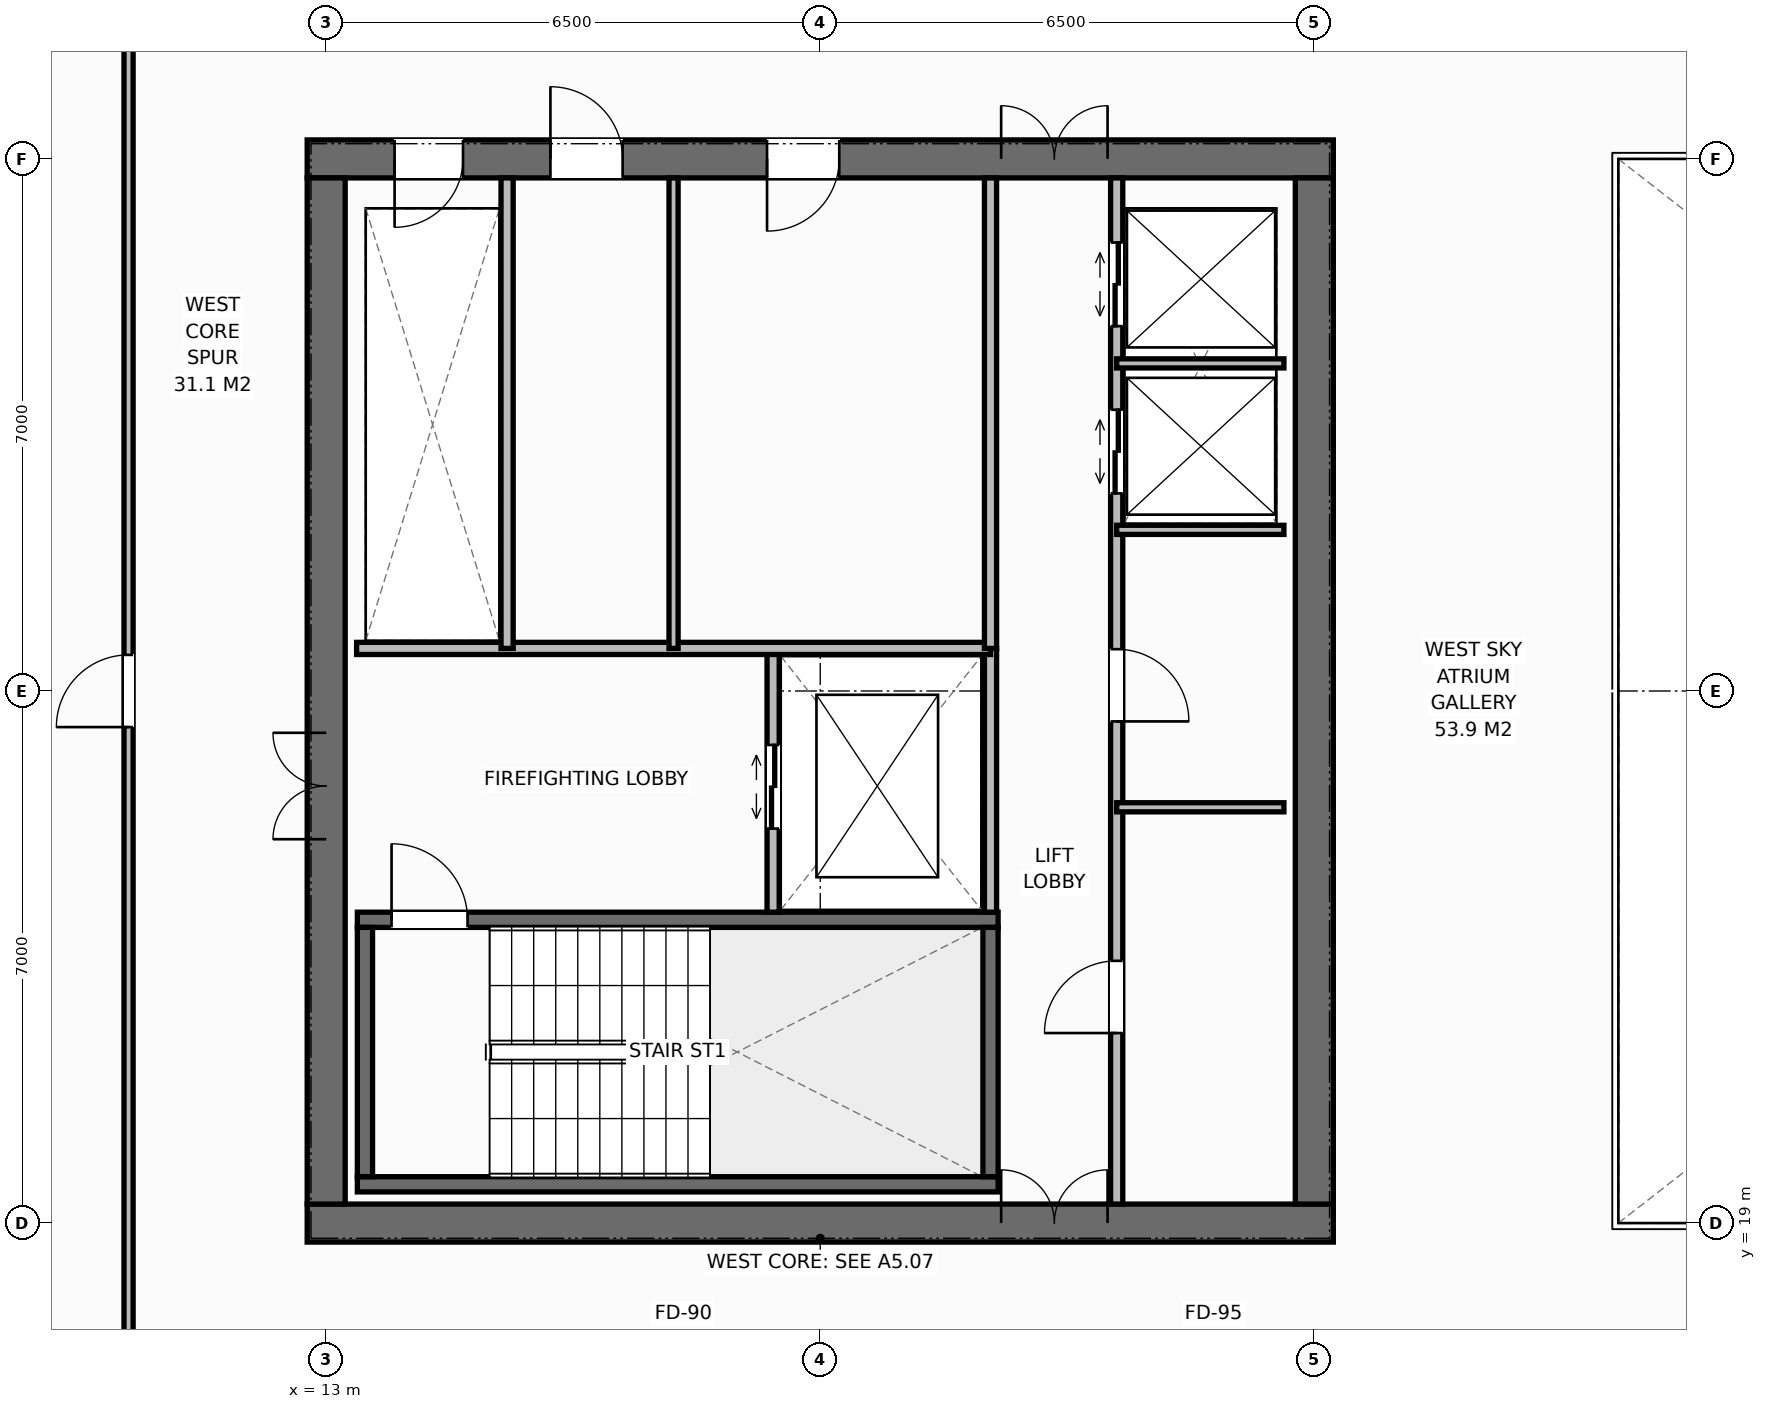
"""IFC4 building model, lengths in metres.
Left out: names, types, materials, properties, quantities, classifications, styles, units other than length and angle.
Written with IfcOpenShell. Run it as: python <this file> out.ifc"""

import sys

from ifc_helpers import new_model, si_unit, direction, frame, frame_2d, origin, place, context, subcontext, project, spatial, rectangle, extrude, element, fill, save


model = new_model("IFC4")
c1 = context("Model", 3, precision=1e-05, world=origin(), true_north=direction((0.0, 1.0)))
c2 = subcontext(c1, "Body", "Model", "MODEL_VIEW")
j1 = project(units=[si_unit("LENGTHUNIT", "METRE"), si_unit("PLANEANGLEUNIT", "RADIAN")], contexts=[c1])
p1 = place(None, origin())
s1 = spatial("IfcSite", under=j1, at=p1, CompositionType="ELEMENT")
p2 = place(p1, origin())
s2 = spatial("IfcBuilding", under=s1, at=p2, CompositionType="ELEMENT")
p3 = place(p2, frame((0.0, 0.0, 236.6)))
s3 = spatial("IfcBuildingStorey", under=s2, at=p3, CompositionType="ELEMENT", Elevation=236.6)
p4 = place(p3, frame((12.75, 19.0, 0.0), z_axis=(0.0, 0.0, 1.0), x_axis=(1.0, 0.0, 0.0)))
e1 = element("IfcWall", 1, at=p4, inside=s3, PredefinedType="SHEAR", context=c2, shape_type="SweptSolid", body=[
    extrude(rectangle(XDim=13.5, YDim=0.5, at=frame_2d((6.75, 0.0))), origin(), (0.0, 0.0, 1.0), 3.8),
])
p5 = place(p4, frame((9.13, 0.0, 0.0)))
e2 = element("IfcOpeningElement", 2, at=p5, cuts=e1, PredefinedType="OPENING", context=c2, shape_type="SweptSolid", body=[
    extrude(rectangle(XDim=1.4, YDim=2.2, at=frame_2d((0.7, 1.1))), frame((0.0, 0.26, 0.0), z_axis=(0.0, -1.0, 0.0), x_axis=(1.0, 0.0, 0.0)), (0.0, 0.0, 1.0), 0.52),
])
p6 = place(p3, frame((12.75, 33.0, 0.0), z_axis=(0.0, 0.0, 1.0), x_axis=(1.0, 0.0, 0.0)))
e3 = element("IfcWall", 3, at=p6, inside=s3, PredefinedType="SHEAR", context=c2, shape_type="SweptSolid", body=[
    extrude(rectangle(XDim=13.5, YDim=0.5, at=frame_2d((6.75, 0.0))), origin(), (0.0, 0.0, 1.0), 3.8),
])
p7 = place(p6, frame((1.15, 0.0, 0.0)))
e4 = element("IfcOpeningElement", 4, at=p7, cuts=e3, PredefinedType="OPENING", context=c2, shape_type="SweptSolid", body=[
    extrude(rectangle(XDim=0.9, YDim=2.15, at=frame_2d((0.45, 1.075))), frame((0.0, 0.26, 0.0), z_axis=(0.0, -1.0, 0.0), x_axis=(1.0, 0.0, 0.0)), (0.0, 0.0, 1.0), 0.52),
])
p8 = place(p6, frame((3.2, 0.0, 0.0)))
e5 = element("IfcOpeningElement", 5, at=p8, cuts=e3, PredefinedType="OPENING", context=c2, shape_type="SweptSolid", body=[
    extrude(rectangle(XDim=0.95, YDim=2.15, at=frame_2d((0.475, 1.075))), frame((0.0, 0.26, 0.0), z_axis=(0.0, -1.0, 0.0), x_axis=(1.0, 0.0, 0.0)), (0.0, 0.0, 1.0), 0.52),
])
p9 = place(p6, frame((6.05, 0.0, 0.0)))
e6 = element("IfcOpeningElement", 6, at=p9, cuts=e3, PredefinedType="OPENING", context=c2, shape_type="SweptSolid", body=[
    extrude(rectangle(XDim=0.95, YDim=2.15, at=frame_2d((0.475, 1.075))), frame((0.0, 0.26, 0.0), z_axis=(0.0, -1.0, 0.0), x_axis=(1.0, 0.0, 0.0)), (0.0, 0.0, 1.0), 0.52),
])
p10 = place(p6, frame((9.13, 0.0, 0.0)))
e7 = element("IfcOpeningElement", 7, at=p10, cuts=e3, PredefinedType="OPENING", context=c2, shape_type="SweptSolid", body=[
    extrude(rectangle(XDim=1.4, YDim=2.2, at=frame_2d((0.7, 1.1))), frame((0.0, 0.26, 0.0), z_axis=(0.0, -1.0, 0.0), x_axis=(1.0, 0.0, 0.0)), (0.0, 0.0, 1.0), 0.52),
])
p11 = place(p3, frame((13.0, 19.25, 0.0), z_axis=(0.0, 0.0, 1.0), x_axis=(0.0, 1.0, 0.0)))
e8 = element("IfcWall", 8, at=p11, inside=s3, PredefinedType="SHEAR", context=c2, shape_type="SweptSolid", body=[
    extrude(rectangle(XDim=13.5, YDim=0.5, at=frame_2d((6.75, 0.0))), origin(), (0.0, 0.0, 1.0), 3.8),
])
p12 = place(p11, frame((4.8, 0.0, 0.0)))
e9 = element("IfcOpeningElement", 9, at=p12, cuts=e8, PredefinedType="OPENING", context=c2, shape_type="SweptSolid", body=[
    extrude(rectangle(XDim=1.4, YDim=2.2, at=frame_2d((0.7, 1.1))), frame((0.0, 0.26, 0.0), z_axis=(0.0, -1.0, 0.0), x_axis=(1.0, 0.0, 0.0)), (0.0, 0.0, 1.0), 0.52),
])
p13 = place(p3, frame((26.0, 19.25, 0.0), z_axis=(0.0, 0.0, 1.0), x_axis=(0.0, 1.0, 0.0)))
e10 = element("IfcWall", 10, at=p13, inside=s3, PredefinedType="SHEAR", context=c2, shape_type="SweptSolid", body=[
    extrude(rectangle(XDim=13.5, YDim=0.5, at=frame_2d((6.75, 0.0))), origin(), (0.0, 0.0, 1.0), 3.8),
])
p14 = place(p3, frame((13.41, 19.51, 0.0), z_axis=(0.0, 0.0, 1.0), x_axis=(1.0, 0.0, 0.0)))
e11 = element("IfcWall", 11, at=p14, inside=s3, PredefinedType="SHEAR", context=c2, shape_type="SweptSolid", body=[
    extrude(rectangle(XDim=8.43, YDim=0.2, at=frame_2d((4.215, 0.0))), origin(), (0.0, 0.0, 1.0), 3.8),
])
p15 = place(p3, frame((13.41, 22.99, 0.0), z_axis=(0.0, 0.0, 1.0), x_axis=(1.0, 0.0, 0.0)))
e12 = element("IfcWall", 12, at=p15, inside=s3, PredefinedType="SHEAR", context=c2, shape_type="SweptSolid", body=[
    extrude(rectangle(XDim=8.43, YDim=0.2, at=frame_2d((4.215, 0.0))), origin(), (0.0, 0.0, 1.0), 3.8),
])
p16 = place(p15, frame((0.45, 0.0, 0.0)))
e13 = element("IfcOpeningElement", 13, at=p16, cuts=e12, PredefinedType="OPENING", context=c2, shape_type="SweptSolid", body=[
    extrude(rectangle(XDim=1.0, YDim=2.15, at=frame_2d((0.5, 1.075))), frame((0.0, 0.11, 0.0), z_axis=(0.0, -1.0, 0.0), x_axis=(1.0, 0.0, 0.0)), (0.0, 0.0, 1.0), 0.22),
])
for number, where, z_axis, x_axis in (
    (14, (13.51, 19.61, 0.0), (0.0, 0.0, 1.0), (0.0, 1.0, 0.0)),
    (15, (21.74, 19.61, 0.0), (0.0, 0.0, 1.0), (0.0, 1.0, 0.0)),
):
    element("IfcWall", number, at=place(p3, frame(where, z_axis=z_axis, x_axis=x_axis)), inside=s3, PredefinedType="SHEAR", context=c2, shape_type="SweptSolid", body=[
        extrude(rectangle(XDim=3.28, YDim=0.2, at=frame_2d((1.64, 0.0))), origin(), (0.0, 0.0, 1.0), 3.8),
    ])
p17 = place(p3, frame((21.74, 23.09, 0.0), z_axis=(0.0, 0.0, 1.0), x_axis=(0.0, 1.0, 0.0)))
e16 = element("IfcWall", 16, at=p17, inside=s3, PredefinedType="STANDARD", context=c2, shape_type="SweptSolid", body=[
    extrude(rectangle(XDim=3.47, YDim=0.16, at=frame_2d((1.735, 0.0))), origin(), (0.0, 0.0, 1.0), 3.58),
])
p18 = place(p3, frame((18.88, 23.09, 0.0), z_axis=(0.0, 0.0, 1.0), x_axis=(0.0, 1.0, 0.0)))
e17 = element("IfcWall", 17, at=p18, inside=s3, PredefinedType="STANDARD", context=c2, shape_type="SweptSolid", body=[
    extrude(rectangle(XDim=3.47, YDim=0.16, at=frame_2d((1.735, 0.0))), origin(), (0.0, 0.0, 1.0), 3.58),
])
p19 = place(p18, frame((1.1, 0.0, 0.0)))
e18 = element("IfcOpeningElement", 18, at=p19, cuts=e17, PredefinedType="OPENING", context=c2, shape_type="SweptSolid", body=[
    extrude(rectangle(XDim=1.1, YDim=2.2, at=frame_2d((0.55, 1.1))), frame((0.0, 0.09, 0.0), z_axis=(0.0, -1.0, 0.0), x_axis=(1.0, 0.0, 0.0)), (0.0, 0.0, 1.0), 0.18),
])
p20 = place(p3, frame((13.4, 26.56, 0.0), z_axis=(0.0, 0.0, 1.0), x_axis=(1.0, 0.0, 0.0)))
e19 = element("IfcWall", 19, at=p20, inside=s3, PredefinedType="STANDARD", context=c2, shape_type="SweptSolid", body=[
    extrude(rectangle(XDim=8.34, YDim=0.16, at=frame_2d((4.17, 0.0))), origin(), (0.0, 0.0, 1.0), 3.58),
])
p21 = place(p3, frame((15.38, 26.56, 0.0), z_axis=(0.0, 0.0, 1.0), x_axis=(0.0, 1.0, 0.0)))
e20 = element("IfcWall", 20, at=p21, inside=s3, PredefinedType="STANDARD", context=c2, shape_type="SweptSolid", body=[
    extrude(rectangle(XDim=6.19, YDim=0.16, at=frame_2d((3.095, 0.0))), origin(), (0.0, 0.0, 1.0), 3.58),
])
p22 = place(p3, frame((17.57, 26.56, 0.0), z_axis=(0.0, 0.0, 1.0), x_axis=(0.0, 1.0, 0.0)))
e21 = element("IfcWall", 21, at=p22, inside=s3, PredefinedType="PARTITIONING", context=c2, shape_type="SweptSolid", body=[
    extrude(rectangle(XDim=6.19, YDim=0.12, at=frame_2d((3.095, 0.0))), origin(), (0.0, 0.0, 1.0), 3.58),
])
p23 = place(p3, frame((21.74, 26.56, 0.0), z_axis=(0.0, 0.0, 1.0), x_axis=(0.0, 1.0, 0.0)))
e22 = element("IfcWall", 22, at=p23, inside=s3, PredefinedType="STANDARD", context=c2, shape_type="SweptSolid", body=[
    extrude(rectangle(XDim=6.19, YDim=0.16, at=frame_2d((3.095, 0.0))), origin(), (0.0, 0.0, 1.0), 3.58),
])
p24 = place(p3, frame((23.4, 19.25, 0.0), z_axis=(0.0, 0.0, 1.0), x_axis=(0.0, 1.0, 0.0)))
e23 = element("IfcWall", 23, at=p24, inside=s3, PredefinedType="STANDARD", context=c2, shape_type="SweptSolid", body=[
    extrude(rectangle(XDim=13.5, YDim=0.16, at=frame_2d((6.75, 0.0))), origin(), (0.0, 0.0, 1.0), 3.58),
])
p25 = place(p24, frame((2.25, 0.0, 0.0)))
e24 = element("IfcOpeningElement", 24, at=p25, cuts=e23, PredefinedType="OPENING", context=c2, shape_type="SweptSolid", body=[
    extrude(rectangle(XDim=0.95, YDim=2.15, at=frame_2d((0.475, 1.075))), frame((0.0, 0.09, 0.0), z_axis=(0.0, -1.0, 0.0), x_axis=(1.0, 0.0, 0.0)), (0.0, 0.0, 1.0), 0.18),
])
p26 = place(p24, frame((6.35, 0.0, 0.0)))
e25 = element("IfcOpeningElement", 25, at=p26, cuts=e23, PredefinedType="OPENING", context=c2, shape_type="SweptSolid", body=[
    extrude(rectangle(XDim=0.95, YDim=2.15, at=frame_2d((0.475, 1.075))), frame((0.0, 0.09, 0.0), z_axis=(0.0, -1.0, 0.0), x_axis=(1.0, 0.0, 0.0)), (0.0, 0.0, 1.0), 0.18),
])
p27 = place(p24, frame((9.35, 0.0, 0.0)))
e26 = element("IfcOpeningElement", 26, at=p27, cuts=e23, PredefinedType="OPENING", context=c2, shape_type="SweptSolid", body=[
    extrude(rectangle(XDim=1.1, YDim=2.2, at=frame_2d((0.55, 1.1))), frame((0.0, 0.09, 0.0), z_axis=(0.0, -1.0, 0.0), x_axis=(1.0, 0.0, 0.0)), (0.0, 0.0, 1.0), 0.18),
])
p28 = place(p24, frame((11.55, 0.0, 0.0)))
e27 = element("IfcOpeningElement", 27, at=p28, cuts=e23, PredefinedType="OPENING", context=c2, shape_type="SweptSolid", body=[
    extrude(rectangle(XDim=1.1, YDim=2.2, at=frame_2d((0.55, 1.1))), frame((0.0, 0.09, 0.0), z_axis=(0.0, -1.0, 0.0), x_axis=(1.0, 0.0, 0.0)), (0.0, 0.0, 1.0), 0.18),
])
for number, where, z_axis, x_axis in (
    (28, (23.4, 24.47, 0.0), (0.0, 0.0, 1.0), (1.0, 0.0, 0.0)),
    (29, (23.4, 28.12, 0.0), (0.0, 0.0, 1.0), (1.0, 0.0, 0.0)),
    (30, (23.4, 30.31, 0.0), (0.0, 0.0, 1.0), (1.0, 0.0, 0.0)),
):
    element("IfcWall", number, at=place(p3, frame(where, z_axis=z_axis, x_axis=x_axis)), inside=s3, PredefinedType="PARTITIONING", context=c2, shape_type="SweptSolid", body=[
        extrude(rectangle(XDim=2.2, YDim=0.12, at=frame_2d((1.1, 0.0))), origin(), (0.0, 0.0, 1.0), 3.58),
    ])
p29 = place(p3, frame((10.4, 16.5, 0.0), z_axis=(0.0, 0.0, 1.0), x_axis=(0.0, 1.0, 0.0)))
e31 = element("IfcWall", 31, at=p29, inside=s3, PredefinedType="PARTITIONING", context=c2, shape_type="SweptSolid", body=[
    extrude(rectangle(XDim=19.0, YDim=0.12, at=frame_2d((9.5, 0.0))), origin(), (0.0, 0.0, 1.0), 3.58),
])
p30 = place(p29, frame((9.025, 0.0, 0.0)))
e32 = element("IfcOpeningElement", 32, at=p30, cuts=e31, PredefinedType="OPENING", context=c2, shape_type="SweptSolid", body=[
    extrude(rectangle(XDim=0.95, YDim=2.15, at=frame_2d((0.475, 1.075))), frame((0.0, 0.07, 0.0), z_axis=(0.0, -1.0, 0.0), x_axis=(1.0, 0.0, 0.0)), (0.0, 0.0, 1.0), 0.14),
])
p31 = place(p16, origin())
e33 = element("IfcDoor", 33, at=p31, inside=s3, OperationType="SINGLE_SWING_LEFT", PredefinedType="DOOR", context=c2, shape_type="SweptSolid", body=[
    extrude(rectangle(XDim=1.0, YDim=2.15, at=frame_2d((0.5, 1.075))), frame((0.0, 0.025, 0.0), z_axis=(0.0, -1.0, 0.0), x_axis=(1.0, 0.0, 0.0)), (0.0, 0.0, 1.0), 0.05),
])
fill(e13, e33)
p32 = place(p12, origin())
e34 = element("IfcDoor", 34, at=p32, inside=s3, OperationType="DOUBLE_DOOR_SINGLE_SWING", PredefinedType="DOOR", context=c2, shape_type="SweptSolid", body=[
    extrude(rectangle(XDim=1.4, YDim=2.2, at=frame_2d((0.7, 1.1))), frame((0.0, 0.025, 0.0), z_axis=(0.0, -1.0, 0.0), x_axis=(1.0, 0.0, 0.0)), (0.0, 0.0, 1.0), 0.05),
])
fill(e9, e34)
p33 = place(p19, origin())
e35 = element("IfcDoor", 35, at=p33, inside=s3, OperationType="DOUBLE_DOOR_SLIDING", PredefinedType="DOOR", context=c2, shape_type="SweptSolid", body=[
    extrude(rectangle(XDim=1.1, YDim=2.2, at=frame_2d((0.55, 1.1))), frame((0.0, 0.025, 0.0), z_axis=(0.0, -1.0, 0.0), x_axis=(1.0, 0.0, 0.0)), (0.0, 0.0, 1.0), 0.05),
])
fill(e18, e35)
p34 = place(p7, origin())
e36 = element("IfcDoor", 36, at=p34, inside=s3, OperationType="SINGLE_SWING_RIGHT", PredefinedType="DOOR", context=c2, shape_type="SweptSolid", body=[
    extrude(rectangle(XDim=0.9, YDim=2.15, at=frame_2d((0.45, 1.075))), frame((0.0, -0.025, 0.0), z_axis=(0.0, -1.0, 0.0), x_axis=(1.0, 0.0, 0.0)), (0.0, 0.0, 1.0), 0.05),
])
fill(e4, e36)
p35 = place(p8, origin())
e37 = element("IfcDoor", 37, at=p35, inside=s3, OperationType="SINGLE_SWING_LEFT", PredefinedType="DOOR", context=c2, shape_type="SweptSolid", body=[
    extrude(rectangle(XDim=0.95, YDim=2.15, at=frame_2d((0.475, 1.075))), frame((0.0, -0.025, 0.0), z_axis=(0.0, -1.0, 0.0), x_axis=(1.0, 0.0, 0.0)), (0.0, 0.0, 1.0), 0.05),
])
fill(e5, e37)
p36 = place(p9, origin())
e38 = element("IfcDoor", 38, at=p36, inside=s3, OperationType="SINGLE_SWING_RIGHT", PredefinedType="DOOR", context=c2, shape_type="SweptSolid", body=[
    extrude(rectangle(XDim=0.95, YDim=2.15, at=frame_2d((0.475, 1.075))), frame((0.0, -0.025, 0.0), z_axis=(0.0, -1.0, 0.0), x_axis=(1.0, 0.0, 0.0)), (0.0, 0.0, 1.0), 0.05),
])
fill(e6, e38)
p37 = place(p5, origin())
e39 = element("IfcDoor", 39, at=p37, inside=s3, OperationType="DOUBLE_DOOR_SINGLE_SWING", PredefinedType="DOOR", context=c2, shape_type="SweptSolid", body=[
    extrude(rectangle(XDim=1.4, YDim=2.2, at=frame_2d((0.7, 1.1))), frame((0.0, 0.075, 0.0), z_axis=(0.0, -1.0, 0.0), x_axis=(1.0, 0.0, 0.0)), (0.0, 0.0, 1.0), 0.05),
])
fill(e2, e39)
p38 = place(p10, origin())
e40 = element("IfcDoor", 40, at=p38, inside=s3, OperationType="DOUBLE_DOOR_SINGLE_SWING", PredefinedType="DOOR", context=c2, shape_type="SweptSolid", body=[
    extrude(rectangle(XDim=1.4, YDim=2.2, at=frame_2d((0.7, 1.1))), frame((0.0, -0.025, 0.0), z_axis=(0.0, -1.0, 0.0), x_axis=(1.0, 0.0, 0.0)), (0.0, 0.0, 1.0), 0.05),
])
fill(e7, e40)
p39 = place(p25, origin())
e41 = element("IfcDoor", 41, at=p39, inside=s3, OperationType="SINGLE_SWING_LEFT", PredefinedType="DOOR", context=c2, shape_type="SweptSolid", body=[
    extrude(rectangle(XDim=0.95, YDim=2.15, at=frame_2d((0.475, 1.075))), frame((0.0, 0.025, 0.0), z_axis=(0.0, -1.0, 0.0), x_axis=(1.0, 0.0, 0.0)), (0.0, 0.0, 1.0), 0.05),
])
fill(e24, e41)
p40 = place(p26, origin())
e42 = element("IfcDoor", 42, at=p40, inside=s3, OperationType="SINGLE_SWING_RIGHT", PredefinedType="DOOR", context=c2, shape_type="SweptSolid", body=[
    extrude(rectangle(XDim=0.95, YDim=2.15, at=frame_2d((0.475, 1.075))), frame((0.0, 0.025, 0.0), z_axis=(0.0, -1.0, 0.0), x_axis=(1.0, 0.0, 0.0)), (0.0, 0.0, 1.0), 0.05),
])
fill(e25, e42)
p41 = place(p27, origin())
e43 = element("IfcDoor", 43, at=p41, inside=s3, OperationType="DOUBLE_DOOR_SLIDING", PredefinedType="DOOR", context=c2, shape_type="SweptSolid", body=[
    extrude(rectangle(XDim=1.1, YDim=2.2, at=frame_2d((0.55, 1.1))), frame((0.0, 0.025, 0.0), z_axis=(0.0, -1.0, 0.0), x_axis=(1.0, 0.0, 0.0)), (0.0, 0.0, 1.0), 0.05),
])
fill(e26, e43)
p42 = place(p28, origin())
e44 = element("IfcDoor", 44, at=p42, inside=s3, OperationType="DOUBLE_DOOR_SLIDING", PredefinedType="DOOR", context=c2, shape_type="SweptSolid", body=[
    extrude(rectangle(XDim=1.1, YDim=2.2, at=frame_2d((0.55, 1.1))), frame((0.0, 0.025, 0.0), z_axis=(0.0, -1.0, 0.0), x_axis=(1.0, 0.0, 0.0)), (0.0, 0.0, 1.0), 0.05),
])
fill(e27, e44)
p43 = place(p30, origin())
e45 = element("IfcDoor", 45, at=p43, inside=s3, OperationType="SINGLE_SWING_LEFT", PredefinedType="DOOR", context=c2, shape_type="SweptSolid", body=[
    extrude(rectangle(XDim=0.95, YDim=2.15, at=frame_2d((0.475, 1.075))), frame((0.0, 0.025, 0.0), z_axis=(0.0, -1.0, 0.0), x_axis=(1.0, 0.0, 0.0)), (0.0, 0.0, 1.0), 0.05),
])
fill(e32, e45)
save(model, sys.argv[1])
